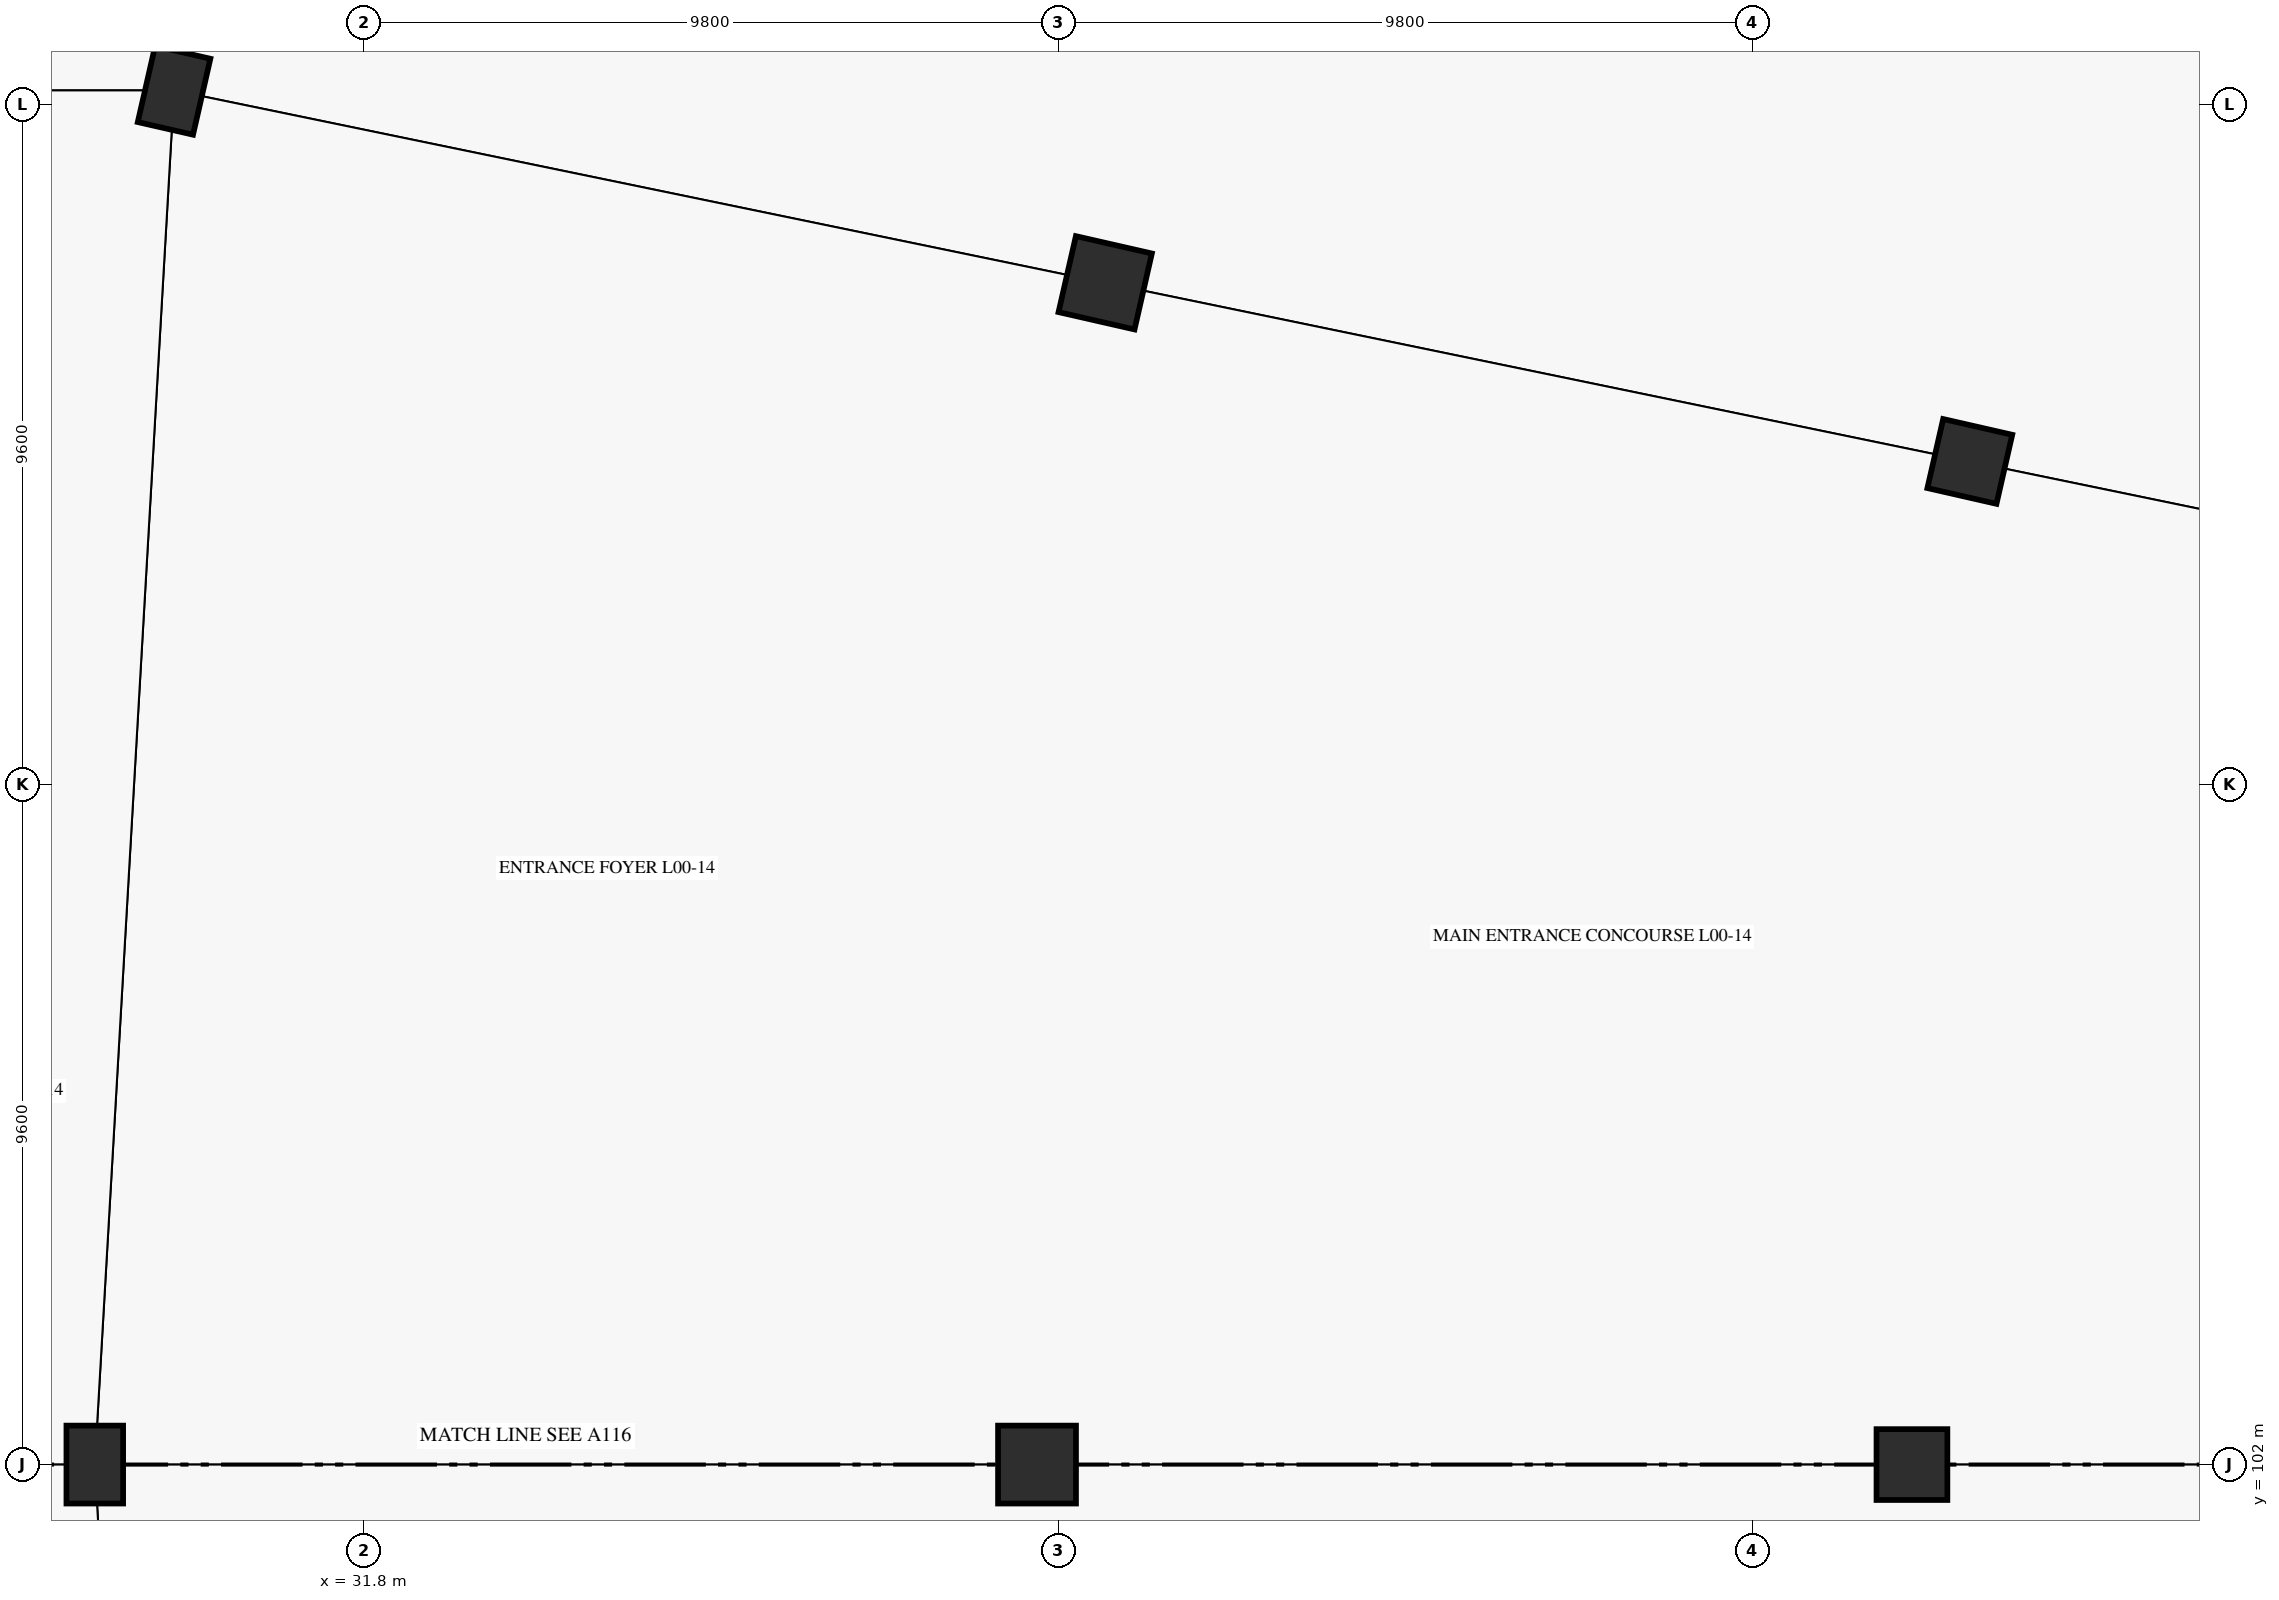
"""IFC4 building model, lengths in metres.
Left out: names, types, materials, properties, quantities, classifications, styles, units other than length and angle.
Written with IfcOpenShell. Run it as: python <this file> out.ifc"""

import sys

from ifc_helpers import new_model, si_unit, direction, frame, frame_2d, origin, origin_2d, place, context, subcontext, project, spatial, rectangle, extrude, element, save


model = new_model("IFC4")
c1 = context("Model", 3, precision=1e-05, world=origin(), true_north=direction((0.0, 1.0)))
c2 = subcontext(c1, "Body", "Model", "MODEL_VIEW")
j1 = project(units=[si_unit("LENGTHUNIT", "METRE"), si_unit("PLANEANGLEUNIT", "RADIAN")], contexts=[c1])
p1 = place(None, origin())
s1 = spatial("IfcSite", under=j1, at=p1, CompositionType="ELEMENT")
p2 = place(p1, origin())
s2 = spatial("IfcBuilding", under=s1, at=p2, CompositionType="ELEMENT")
p3 = place(p2, origin())
s3 = spatial("IfcBuildingStorey", under=s2, at=p3, CompositionType="ELEMENT", Elevation=0.0)
for number, where, z_axis, x_axis in (
    (1, (54.467, 116.16, 0.0), (0.0, 0.0, 1.0), (-0.975, 0.223, 0.0)),
    (2, (53.65, 102.0, 0.0), (0.0, 0.0, 1.0), (-1.0, 0.0, 0.0)),
):
    element("IfcColumn", number, at=place(p3, frame(where, z_axis=z_axis, x_axis=x_axis)), inside=s3, PredefinedType="COLUMN", context=c2, shape_type="SweptSolid", body=[
        extrude(rectangle(XDim=1.0, YDim=1.0, at=origin_2d()), origin(), (0.0, 0.0, 1.0), 5.78),
    ])
for number, where, z_axis, x_axis in (
    (3, (42.262, 118.682, 0.0), (0.0, 0.0, 1.0), (-0.975, 0.223, 0.0)),
    (4, (41.3, 102.0, 0.0), (0.0, 0.0, 1.0), (-1.0, 0.0, 0.0)),
):
    element("IfcColumn", number, at=place(p3, frame(where, z_axis=z_axis, x_axis=x_axis)), inside=s3, PredefinedType="COLUMN", context=c2, shape_type="SweptSolid", body=[
        extrude(rectangle(XDim=1.1, YDim=1.1, at=origin_2d()), origin(), (0.0, 0.0, 1.0), 5.78),
    ])
for number, where, z_axis, x_axis in (
    (5, (29.119, 121.398, 0.0), (0.0, 0.0, 1.0), (-0.975, 0.223, 0.0)),
    (6, (28.0, 102.0, 0.0), (0.0, 0.0, 1.0), (-1.0, 0.0, 0.0)),
):
    element("IfcColumn", number, at=place(p3, frame(where, z_axis=z_axis, x_axis=x_axis)), inside=s3, PredefinedType="COLUMN", context=c2, shape_type="SweptSolid", body=[
        extrude(rectangle(XDim=0.8, YDim=1.1, at=origin_2d()), origin(), (0.0, 0.0, 1.0), 5.78),
    ])
p4 = place(p3, frame((28.02, 140.382, 0.0), z_axis=(0.0, 0.0, 1.0), x_axis=(-0.249965196191, -0.968254822189, 0.0)))
e7 = element("IfcWall", 7, at=p4, inside=s3, PredefinedType="SOLIDWALL", context=c2, shape_type="SweptSolid", body=[
    extrude(rectangle(XDim=19.226, YDim=0.3, at=frame_2d((9.613, 0.0))), origin(), (0.0, 0.0, 1.0), 4.8),
])
p5 = place(p4, frame((7.913, 0.0, 0.0)))
e8 = element("IfcOpeningElement", 8, at=p5, cuts=e7, PredefinedType="OPENING", context=c2, shape_type="SweptSolid", body=[
    extrude(rectangle(XDim=3.4, YDim=2.6, at=frame_2d((1.7, 1.3))), frame((0.0, 0.16, 0.0), z_axis=(0.0, -1.0, 0.0), x_axis=(1.0, 0.0, 0.0)), (0.0, 0.0, 1.0), 0.32),
])
p6 = place(p4, frame((4.613, 0.0, 1.1)))
e9 = element("IfcOpeningElement", 9, at=p6, cuts=e7, PredefinedType="OPENING", context=c2, shape_type="SweptSolid", body=[
    extrude(rectangle(XDim=2.4, YDim=1.8, at=frame_2d((1.2, 0.9))), frame((0.0, 0.16, 0.0), z_axis=(0.0, -1.0, 0.0), x_axis=(1.0, 0.0, 0.0)), (0.0, 0.0, 1.0), 0.32),
])
save(model, sys.argv[1])
